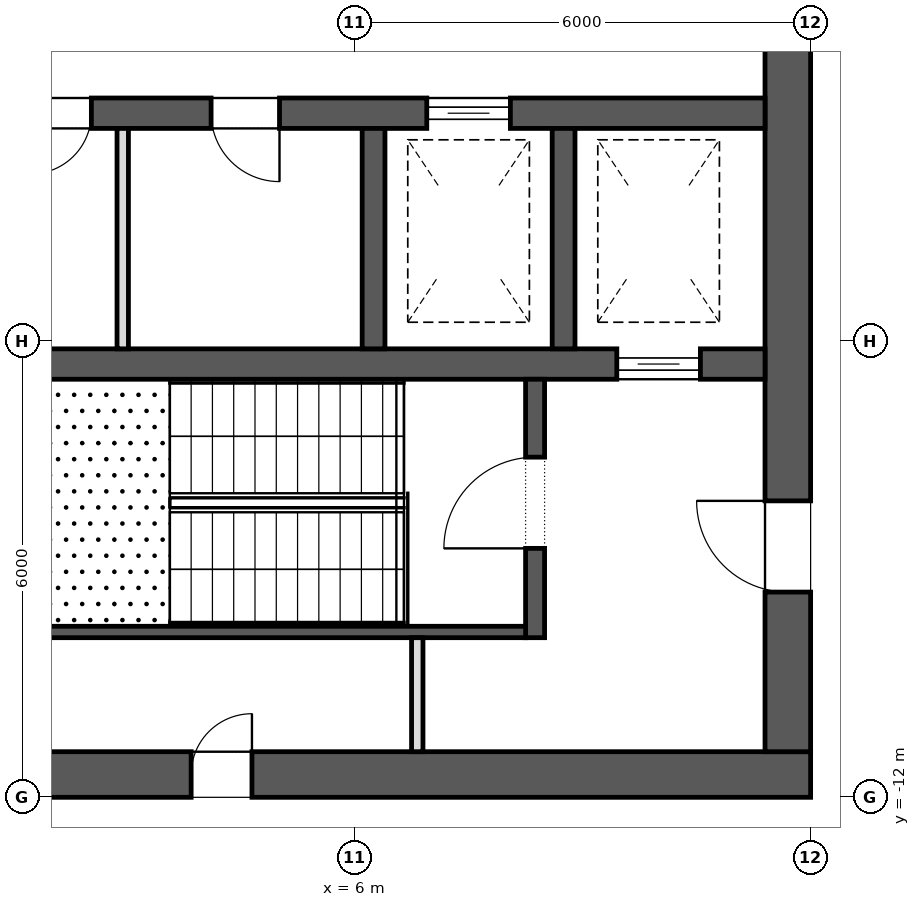
"""IFC4 building model, lengths in metres.
Left out: names, types, materials, properties, quantities, classifications, styles, units other than length and angle.
Written with IfcOpenShell. Run it as: python <this file> out.ifc"""

import sys

from ifc_helpers import new_model, si_unit, direction, frame, frame_2d, origin, place, context, subcontext, project, spatial, rectangle, extrude, element, fill, save


model = new_model("IFC4")
c1 = context("Model", 3, precision=1e-05, world=origin(), true_north=direction((0.0, 1.0)))
c2 = subcontext(c1, "Body", "Model", "MODEL_VIEW")
j1 = project(units=[si_unit("LENGTHUNIT", "METRE"), si_unit("PLANEANGLEUNIT", "RADIAN")], contexts=[c1])
p1 = place(None, origin())
s1 = spatial("IfcSite", under=j1, at=p1, CompositionType="ELEMENT")
p2 = place(p1, origin())
s2 = spatial("IfcBuilding", under=s1, at=p2, CompositionType="ELEMENT")
p3 = place(p2, frame((0.0, 0.0, 202.9)))
s3 = spatial("IfcBuildingStorey", under=s2, at=p3, CompositionType="ELEMENT", Elevation=202.9)
p4 = place(p3, frame((-12.0, -11.7, 0.0), z_axis=(0.0, 0.0, 1.0), x_axis=(1.0, 0.0, 0.0)))
e1 = element("IfcWall", 1, at=p4, inside=s3, PredefinedType="SHEAR", context=c2, shape_type="SweptSolid", body=[
    extrude(rectangle(XDim=24.0, YDim=0.6, at=frame_2d((12.0, 0.0))), origin(), (0.0, 0.0, 1.0), 4.0),
])
p5 = place(p4, frame((9.975, 0.0, 0.0)))
e2 = element("IfcOpeningElement", 2, at=p5, cuts=e1, PredefinedType="OPENING", context=c2, shape_type="SweptSolid", body=[
    extrude(rectangle(XDim=0.9, YDim=2.1, at=frame_2d((0.45, 1.05))), frame((0.0, 0.312, 0.0), z_axis=(0.0, -1.0, 0.0), x_axis=(1.0, 0.0, 0.0)), (0.0, 0.0, 1.0), 0.624),
])
p6 = place(p4, frame((3.8, 0.0, 0.0)))
e3 = element("IfcOpeningElement", 3, at=p6, cuts=e1, PredefinedType="OPENING", context=c2, shape_type="SweptSolid", body=[
    extrude(rectangle(XDim=0.8, YDim=2.1, at=frame_2d((0.4, 1.05))), frame((0.0, 0.312, 0.0), z_axis=(0.0, -1.0, 0.0), x_axis=(1.0, 0.0, 0.0)), (0.0, 0.0, 1.0), 0.624),
])
p7 = place(p4, frame((5.8, 0.0, 0.0)))
e4 = element("IfcOpeningElement", 4, at=p7, cuts=e1, PredefinedType="OPENING", context=c2, shape_type="SweptSolid", body=[
    extrude(rectangle(XDim=0.8, YDim=2.1, at=frame_2d((0.4, 1.05))), frame((0.0, 0.312, 0.0), z_axis=(0.0, -1.0, 0.0), x_axis=(1.0, 0.0, 0.0)), (0.0, 0.0, 1.0), 0.624),
])
p8 = place(p4, frame((7.5, 0.0, 0.0)))
e5 = element("IfcOpeningElement", 5, at=p8, cuts=e1, PredefinedType="OPENING", context=c2, shape_type="SweptSolid", body=[
    extrude(rectangle(XDim=0.8, YDim=2.1, at=frame_2d((0.4, 1.05))), frame((0.0, 0.312, 0.0), z_axis=(0.0, -1.0, 0.0), x_axis=(1.0, 0.0, 0.0)), (0.0, 0.0, 1.0), 0.624),
])
p9 = place(p4, frame((15.85, 0.0, 0.0)))
e6 = element("IfcOpeningElement", 6, at=p9, cuts=e1, PredefinedType="OPENING", context=c2, shape_type="SweptSolid", body=[
    extrude(rectangle(XDim=0.8, YDim=2.1, at=frame_2d((0.4, 1.05))), frame((0.0, 0.312, 0.0), z_axis=(0.0, -1.0, 0.0), x_axis=(1.0, 0.0, 0.0)), (0.0, 0.0, 1.0), 0.624),
])
p10 = place(p3, frame((11.7, -11.4, 0.0), z_axis=(0.0, 0.0, 1.0), x_axis=(0.0, 1.0, 0.0)))
e7 = element("IfcWall", 7, at=p10, inside=s3, PredefinedType="SHEAR", context=c2, shape_type="SweptSolid", body=[
    extrude(rectangle(XDim=22.8, YDim=0.6, at=frame_2d((11.4, 0.0))), origin(), (0.0, 0.0, 1.0), 4.0),
])
p11 = place(p10, frame((10.2, 0.0, 0.0)))
e8 = element("IfcOpeningElement", 8, at=p11, cuts=e7, PredefinedType="OPENING", context=c2, shape_type="SweptSolid", body=[
    extrude(rectangle(XDim=2.4, YDim=2.1, at=frame_2d((1.2, 1.05))), frame((0.0, 0.312, 0.0), z_axis=(0.0, -1.0, 0.0), x_axis=(1.0, 0.0, 0.0)), (0.0, 0.0, 1.0), 0.624),
])
p12 = place(p10, frame((19.5, 0.0, 0.0)))
e9 = element("IfcOpeningElement", 9, at=p12, cuts=e7, PredefinedType="OPENING", context=c2, shape_type="SweptSolid", body=[
    extrude(rectangle(XDim=1.2, YDim=2.1, at=frame_2d((0.6, 1.05))), frame((0.0, 0.312, 0.0), z_axis=(0.0, -1.0, 0.0), x_axis=(1.0, 0.0, 0.0)), (0.0, 0.0, 1.0), 0.624),
])
p13 = place(p10, frame((2.1, 0.0, 0.0)))
e10 = element("IfcOpeningElement", 10, at=p13, cuts=e7, PredefinedType="OPENING", context=c2, shape_type="SweptSolid", body=[
    extrude(rectangle(XDim=1.2, YDim=2.1, at=frame_2d((0.6, 1.05))), frame((0.0, 0.312, 0.0), z_axis=(0.0, -1.0, 0.0), x_axis=(1.0, 0.0, 0.0)), (0.0, 0.0, 1.0), 0.624),
])
p14 = place(p3, frame((-11.4, -3.0, 0.0), z_axis=(0.0, 0.0, 1.0), x_axis=(1.0, 0.0, 0.0)))
e11 = element("IfcWall", 11, at=p14, inside=s3, PredefinedType="SHEAR", context=c2, shape_type="SweptSolid", body=[
    extrude(rectangle(XDim=22.8, YDim=0.4, at=frame_2d((11.4, 0.0))), origin(), (0.0, 0.0, 1.0), 4.0),
])
p15 = place(p14, frame((0.85, 0.0, 0.0)))
e12 = element("IfcOpeningElement", 12, at=p15, cuts=e11, PredefinedType="OPENING", context=c2, shape_type="SweptSolid", body=[
    extrude(rectangle(XDim=1.1, YDim=2.1, at=frame_2d((0.55, 1.05))), frame((0.0, 0.212, 0.0), z_axis=(0.0, -1.0, 0.0), x_axis=(1.0, 0.0, 0.0)), (0.0, 0.0, 1.0), 0.424),
])
p16 = place(p14, frame((3.35, 0.0, 0.0)))
e13 = element("IfcOpeningElement", 13, at=p16, cuts=e11, PredefinedType="OPENING", context=c2, shape_type="SweptSolid", body=[
    extrude(rectangle(XDim=1.1, YDim=2.1, at=frame_2d((0.55, 1.05))), frame((0.0, 0.212, 0.0), z_axis=(0.0, -1.0, 0.0), x_axis=(1.0, 0.0, 0.0)), (0.0, 0.0, 1.0), 0.424),
])
p17 = place(p14, frame((5.85, 0.0, 0.0)))
e14 = element("IfcOpeningElement", 14, at=p17, cuts=e11, PredefinedType="OPENING", context=c2, shape_type="SweptSolid", body=[
    extrude(rectangle(XDim=1.1, YDim=2.1, at=frame_2d((0.55, 1.05))), frame((0.0, 0.212, 0.0), z_axis=(0.0, -1.0, 0.0), x_axis=(1.0, 0.0, 0.0)), (0.0, 0.0, 1.0), 0.424),
])
p18 = place(p14, frame((8.35, 0.0, 0.0)))
e15 = element("IfcOpeningElement", 15, at=p18, cuts=e11, PredefinedType="OPENING", context=c2, shape_type="SweptSolid", body=[
    extrude(rectangle(XDim=1.1, YDim=2.1, at=frame_2d((0.55, 1.05))), frame((0.0, 0.212, 0.0), z_axis=(0.0, -1.0, 0.0), x_axis=(1.0, 0.0, 0.0)), (0.0, 0.0, 1.0), 0.424),
])
p19 = place(p14, frame((18.35, 0.0, 0.0)))
e16 = element("IfcOpeningElement", 16, at=p19, cuts=e11, PredefinedType="OPENING", context=c2, shape_type="SweptSolid", body=[
    extrude(rectangle(XDim=1.1, YDim=2.1, at=frame_2d((0.55, 1.05))), frame((0.0, 0.212, 0.0), z_axis=(0.0, -1.0, 0.0), x_axis=(1.0, 0.0, 0.0)), (0.0, 0.0, 1.0), 0.424),
])
p20 = place(p14, frame((13.137, 0.0, 0.0)))
e17 = element("IfcOpeningElement", 17, at=p20, cuts=e11, PredefinedType="OPENING", context=c2, shape_type="SweptSolid", body=[
    extrude(rectangle(XDim=0.8, YDim=2.1, at=frame_2d((0.4, 1.05))), frame((0.0, 0.212, 0.0), z_axis=(0.0, -1.0, 0.0), x_axis=(1.0, 0.0, 0.0)), (0.0, 0.0, 1.0), 0.424),
])
p21 = place(p14, frame((15.512, 0.0, 0.0)))
e18 = element("IfcOpeningElement", 18, at=p21, cuts=e11, PredefinedType="OPENING", context=c2, shape_type="SweptSolid", body=[
    extrude(rectangle(XDim=0.9, YDim=2.1, at=frame_2d((0.45, 1.05))), frame((0.0, 0.212, 0.0), z_axis=(0.0, -1.0, 0.0), x_axis=(1.0, 0.0, 0.0)), (0.0, 0.0, 1.0), 0.424),
])
p22 = place(p3, frame((-11.4, -6.3, 0.0), z_axis=(0.0, 0.0, 1.0), x_axis=(1.0, 0.0, 0.0)))
e19 = element("IfcWall", 19, at=p22, inside=s3, PredefinedType="SHEAR", context=c2, shape_type="SweptSolid", body=[
    extrude(rectangle(XDim=22.8, YDim=0.4, at=frame_2d((11.4, 0.0))), origin(), (0.0, 0.0, 1.0), 4.0),
])
p23 = place(p22, frame((20.85, 0.0, 0.0)))
e20 = element("IfcOpeningElement", 20, at=p23, cuts=e19, PredefinedType="OPENING", context=c2, shape_type="SweptSolid", body=[
    extrude(rectangle(XDim=1.1, YDim=2.1, at=frame_2d((0.55, 1.05))), frame((0.0, 0.212, 0.0), z_axis=(0.0, -1.0, 0.0), x_axis=(1.0, 0.0, 0.0)), (0.0, 0.0, 1.0), 0.424),
])
for number, where, z_axis, x_axis in (
    (21, (6.25, -6.1, 0.0), (0.0, 0.0, 1.0), (0.0, 1.0, 0.0)),
    (22, (8.75, -6.1, 0.0), (0.0, 0.0, 1.0), (0.0, 1.0, 0.0)),
):
    element("IfcWall", number, at=place(p3, frame(where, z_axis=z_axis, x_axis=x_axis)), inside=s3, PredefinedType="SHEAR", context=c2, shape_type="SweptSolid", body=[
        extrude(rectangle(XDim=2.9, YDim=0.3, at=frame_2d((1.45, 0.0))), origin(), (0.0, 0.0, 1.0), 4.0),
    ])
p24 = place(p3, frame((8.375, -9.9, 0.0), z_axis=(0.0, 0.0, 1.0), x_axis=(0.0, 1.0, 0.0)))
e23 = element("IfcWall", 23, at=p24, inside=s3, PredefinedType="SHEAR", context=c2, shape_type="SweptSolid", body=[
    extrude(rectangle(XDim=3.4, YDim=0.25, at=frame_2d((1.7, 0.0))), origin(), (0.0, 0.0, 1.0), 3.7),
])
p25 = place(p24, frame((1.175, 0.0, 0.0)))
e24 = element("IfcOpeningElement", 24, at=p25, cuts=e23, PredefinedType="OPENING", context=c2, shape_type="SweptSolid", body=[
    extrude(rectangle(XDim=1.2, YDim=2.1, at=frame_2d((0.6, 1.05))), frame((0.0, 0.137, 0.0), z_axis=(0.0, -1.0, 0.0), x_axis=(1.0, 0.0, 0.0)), (0.0, 0.0, 1.0), 0.274),
])
p26 = place(p3, frame((0.25, -9.825, 0.0), z_axis=(0.0, 0.0, 1.0), x_axis=(1.0, 0.0, 0.0)))
e25 = element("IfcWall", 25, at=p26, inside=s3, PredefinedType="SHEAR", context=c2, shape_type="SweptSolid", body=[
    extrude(rectangle(XDim=8.0, YDim=0.15, at=frame_2d((4.0, 0.0))), origin(), (0.0, 0.0, 1.0), 3.7),
])
p27 = place(p3, frame((6.825, -11.4, 0.0), z_axis=(0.0, 0.0, 1.0), x_axis=(0.0, 1.0, 0.0)))
e26 = element("IfcWall", 26, at=p27, inside=s3, PredefinedType="PARTITIONING", context=c2, shape_type="SweptSolid", body=[
    extrude(rectangle(XDim=1.5, YDim=0.15, at=frame_2d((0.75, 0.0))), origin(), (0.0, 0.0, 1.0), 3.7),
])
p28 = place(p3, frame((2.95, -6.1, 0.0), z_axis=(0.0, 0.0, 1.0), x_axis=(0.0, 1.0, 0.0)))
e27 = element("IfcWall", 27, at=p28, inside=s3, PredefinedType="PARTITIONING", context=c2, shape_type="SweptSolid", body=[
    extrude(rectangle(XDim=2.9, YDim=0.15, at=frame_2d((1.45, 0.0))), origin(), (0.0, 0.0, 1.0), 3.7),
])
p29 = place(p23, origin())
e28 = element("IfcDoor", 28, at=p29, inside=s3, OperationType="SLIDING_TO_LEFT", PredefinedType="DOOR", context=c2, shape_type="SweptSolid", body=[
    extrude(rectangle(XDim=1.1, YDim=2.1, at=frame_2d((0.55, 1.05))), frame((0.0, 0.025, 0.0), z_axis=(0.0, -1.0, 0.0), x_axis=(1.0, 0.0, 0.0)), (0.0, 0.0, 1.0), 0.05),
])
fill(e20, e28)
p30 = place(p19, origin())
e29 = element("IfcDoor", 29, at=p30, inside=s3, OperationType="SLIDING_TO_LEFT", PredefinedType="DOOR", context=c2, shape_type="SweptSolid", body=[
    extrude(rectangle(XDim=1.1, YDim=2.1, at=frame_2d((0.55, 1.05))), frame((0.0, 0.025, 0.0), z_axis=(0.0, -1.0, 0.0), x_axis=(1.0, 0.0, 0.0)), (0.0, 0.0, 1.0), 0.05),
])
fill(e16, e29)
p31 = place(p25, origin())
e30 = element("IfcDoor", 30, at=p31, inside=s3, OperationType="SINGLE_SWING_RIGHT", PredefinedType="DOOR", context=c2, shape_type="SweptSolid", body=[
    extrude(rectangle(XDim=1.2, YDim=2.1, at=frame_2d((0.6, 1.05))), frame((0.0, 0.025, 0.0), z_axis=(0.0, -1.0, 0.0), x_axis=(1.0, 0.0, 0.0)), (0.0, 0.0, 1.0), 0.05),
])
fill(e24, e30)
p32 = place(p13, origin())
e31 = element("IfcDoor", 31, at=p32, inside=s3, OperationType="SINGLE_SWING_LEFT", PredefinedType="DOOR", context=c2, shape_type="SweptSolid", body=[
    extrude(rectangle(XDim=1.2, YDim=2.1, at=frame_2d((0.6, 1.05))), frame((0.0, 0.025, 0.0), z_axis=(0.0, -1.0, 0.0), x_axis=(1.0, 0.0, 0.0)), (0.0, 0.0, 1.0), 0.05),
])
fill(e10, e31)
p33 = place(p9, origin())
e32 = element("IfcDoor", 32, at=p33, inside=s3, OperationType="SINGLE_SWING_LEFT", PredefinedType="DOOR", context=c2, shape_type="SweptSolid", body=[
    extrude(rectangle(XDim=0.8, YDim=2.1, at=frame_2d((0.4, 1.05))), frame((0.0, 0.025, 0.0), z_axis=(0.0, -1.0, 0.0), x_axis=(1.0, 0.0, 0.0)), (0.0, 0.0, 1.0), 0.05),
])
fill(e6, e32)
p34 = place(p20, frame((0.8, 0.0, 0.0), z_axis=(0.0, 0.0, 1.0), x_axis=(-1.0, 0.0, 0.0)))
e33 = element("IfcDoor", 33, at=p34, inside=s3, OperationType="SINGLE_SWING_LEFT", PredefinedType="DOOR", context=c2, shape_type="SweptSolid", body=[
    extrude(rectangle(XDim=0.8, YDim=2.1, at=frame_2d((0.4, 1.05))), frame((0.0, 0.025, 0.0), z_axis=(0.0, -1.0, 0.0), x_axis=(1.0, 0.0, 0.0)), (0.0, 0.0, 1.0), 0.05),
])
fill(e17, e33)
p35 = place(p21, frame((0.9, 0.0, 0.0), z_axis=(0.0, 0.0, 1.0), x_axis=(-1.0, 0.0, 0.0)))
e34 = element("IfcDoor", 34, at=p35, inside=s3, OperationType="SINGLE_SWING_RIGHT", PredefinedType="DOOR", context=c2, shape_type="SweptSolid", body=[
    extrude(rectangle(XDim=0.9, YDim=2.1, at=frame_2d((0.45, 1.05))), frame((0.0, 0.025, 0.0), z_axis=(0.0, -1.0, 0.0), x_axis=(1.0, 0.0, 0.0)), (0.0, 0.0, 1.0), 0.05),
])
fill(e18, e34)
save(model, sys.argv[1])
